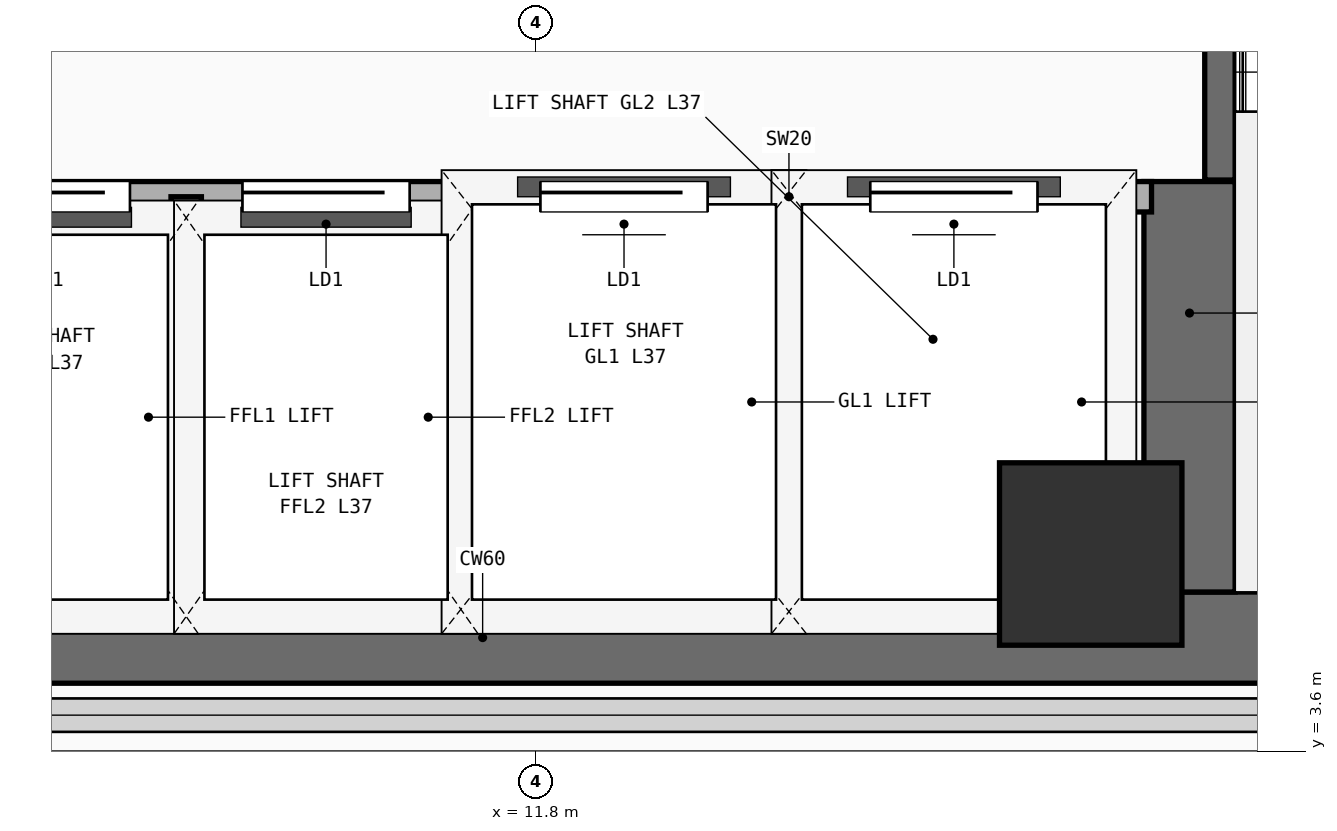
"""IFC4 building model, lengths in metres.
Left out: names, types, materials, properties, quantities, classifications, styles, units other than length and angle.
Written with IfcOpenShell. Run it as: python <this file> out.ifc"""

import sys

from ifc_helpers import new_model, si_unit, direction, frame, frame_2d, origin, origin_2d, place, context, subcontext, project, spatial, rectangle, extrude, element, fill, save


model = new_model("IFC4")
c1 = context("Model", 3, precision=1e-05, world=origin(), true_north=direction((0.0, 1.0)))
c2 = subcontext(c1, "Body", "Model", "MODEL_VIEW")
j1 = project(units=[si_unit("LENGTHUNIT", "METRE"), si_unit("PLANEANGLEUNIT", "RADIAN")], contexts=[c1])
p1 = place(None, origin())
s1 = spatial("IfcSite", under=j1, at=p1, CompositionType="ELEMENT")
p2 = place(p1, origin())
s2 = spatial("IfcBuilding", under=s1, at=p2, CompositionType="ELEMENT")
p3 = place(p2, frame((0.0, 0.0, 146.2)))
s3 = spatial("IfcBuildingStorey", under=s2, at=p3, CompositionType="ELEMENT", Elevation=146.2)
p4 = place(p3, frame((7.15, 4.35, 0.0), z_axis=(0.0, 0.0, 1.0), x_axis=(1.0, 0.0, 0.0)))
e1 = element("IfcWall", 1, at=p4, inside=s3, PredefinedType="SHEAR", context=c2, shape_type="SweptSolid", body=[
    extrude(rectangle(XDim=13.95, YDim=0.6, at=frame_2d((6.975, 0.0))), origin(), (0.0, 0.0, 1.0), 3.56),
])
p5 = place(p3, frame((16.1, 4.65, 0.0), z_axis=(0.0, 0.0, 1.0), x_axis=(0.0, 1.0, 0.0)))
e2 = element("IfcWall", 2, at=p5, inside=s3, PredefinedType="SHEAR", context=c2, shape_type="SweptSolid", body=[
    extrude(rectangle(XDim=2.7, YDim=0.6, at=frame_2d((1.35, 0.0))), origin(), (0.0, 0.0, 1.0), 3.56),
])
p6 = place(p3, frame((15.45, 4.9, 0.0), z_axis=(0.0, 0.0, 1.0), x_axis=(1.0, 0.0, 0.0)))
e3 = element("IfcColumn", 3, at=p6, inside=s3, PredefinedType="COLUMN", context=c2, shape_type="SweptSolid", body=[
    extrude(rectangle(XDim=1.2, YDim=1.2, at=origin_2d()), origin(), (0.0, 0.0, 1.0), 3.56),
])
p7 = place(p3, frame((16.3, 7.36, 0.0), z_axis=(0.0, 0.0, 1.0), x_axis=(0.0, 1.0, 0.0)))
e4 = element("IfcWall", 4, at=p7, inside=s3, PredefinedType="SHEAR", context=c2, shape_type="SweptSolid", body=[
    extrude(rectangle(XDim=2.58, YDim=0.2, at=frame_2d((1.29, 0.0))), origin(), (0.0, 0.0, 1.0), 3.56),
])
p8 = place(p3, frame((7.5, 7.25, 0.0), z_axis=(0.0, 0.0, 1.0), x_axis=(1.0, 0.0, 0.0)))
e5 = element("IfcWall", 5, at=p8, inside=s3, PredefinedType="PARTITIONING", context=c2, shape_type="SweptSolid", body=[
    extrude(rectangle(XDim=8.35, YDim=0.2, at=frame_2d((4.175, 0.0))), origin(), (0.0, 0.0, 1.0), 3.56),
])
p9 = place(p8, frame((0.53, 0.0, 0.0)))
e6 = element("IfcOpeningElement", 6, at=p9, cuts=e5, PredefinedType="OPENING", context=c2, shape_type="SweptSolid", body=[
    extrude(rectangle(XDim=1.1, YDim=2.2, at=frame_2d((0.55, 1.1))), frame((0.0, 0.11, 0.0), z_axis=(0.0, -1.0, 0.0), x_axis=(1.0, 0.0, 0.0)), (0.0, 0.0, 1.0), 0.22),
])
p10 = place(p8, frame((2.37, 0.0, 0.0)))
e7 = element("IfcOpeningElement", 7, at=p10, cuts=e5, PredefinedType="OPENING", context=c2, shape_type="SweptSolid", body=[
    extrude(rectangle(XDim=1.1, YDim=2.2, at=frame_2d((0.55, 1.1))), frame((0.0, 0.11, 0.0), z_axis=(0.0, -1.0, 0.0), x_axis=(1.0, 0.0, 0.0)), (0.0, 0.0, 1.0), 0.22),
])
p11 = place(p8, frame((4.33, 0.0, 0.0)))
e8 = element("IfcOpeningElement", 8, at=p11, cuts=e5, PredefinedType="OPENING", context=c2, shape_type="SweptSolid", body=[
    extrude(rectangle(XDim=1.1, YDim=2.2, at=frame_2d((0.55, 1.1))), frame((0.0, 0.11, 0.0), z_axis=(0.0, -1.0, 0.0), x_axis=(1.0, 0.0, 0.0)), (0.0, 0.0, 1.0), 0.22),
])
p12 = place(p8, frame((6.5, 0.0, 0.0)))
e9 = element("IfcOpeningElement", 9, at=p12, cuts=e5, PredefinedType="OPENING", context=c2, shape_type="SweptSolid", body=[
    extrude(rectangle(XDim=1.1, YDim=2.2, at=frame_2d((0.55, 1.1))), frame((0.0, 0.11, 0.0), z_axis=(0.0, -1.0, 0.0), x_axis=(1.0, 0.0, 0.0)), (0.0, 0.0, 1.0), 0.22),
])
for number, where, z_axis, x_axis in (
    (10, (9.5, 4.45, 0.0), (0.0, 0.0, 1.0), (0.0, 1.0, 0.0)),
    (11, (11.36, 4.45, 0.0), (0.0, 0.0, 1.0), (0.0, 1.0, 0.0)),
    (12, (13.46, 4.45, 0.0), (0.0, 0.0, 1.0), (0.0, 1.0, 0.0)),
):
    element("IfcWall", number, at=place(p3, frame(where, z_axis=z_axis, x_axis=x_axis)), inside=s3, PredefinedType="PARTITIONING", context=c2, shape_type="SweptSolid", body=[
        extrude(rectangle(XDim=2.8, YDim=0.2, at=frame_2d((1.4, 0.0))), origin(), (0.0, 0.0, 1.0), 3.56),
    ])
p13 = place(p9, origin())
e13 = element("IfcDoor", 13, at=p13, inside=s3, OperationType="SLIDING_TO_LEFT", PredefinedType="DOOR", context=c2, shape_type="SweptSolid", body=[
    extrude(rectangle(XDim=1.1, YDim=2.2, at=frame_2d((0.55, 1.1))), frame((0.0, 0.025, 0.0), z_axis=(0.0, -1.0, 0.0), x_axis=(1.0, 0.0, 0.0)), (0.0, 0.0, 1.0), 0.05),
])
fill(e6, e13)
p14 = place(p10, origin())
e14 = element("IfcDoor", 14, at=p14, inside=s3, OperationType="SLIDING_TO_LEFT", PredefinedType="DOOR", context=c2, shape_type="SweptSolid", body=[
    extrude(rectangle(XDim=1.1, YDim=2.2, at=frame_2d((0.55, 1.1))), frame((0.0, 0.025, 0.0), z_axis=(0.0, -1.0, 0.0), x_axis=(1.0, 0.0, 0.0)), (0.0, 0.0, 1.0), 0.05),
])
fill(e7, e14)
p15 = place(p11, origin())
e15 = element("IfcDoor", 15, at=p15, inside=s3, OperationType="SLIDING_TO_LEFT", PredefinedType="DOOR", context=c2, shape_type="SweptSolid", body=[
    extrude(rectangle(XDim=1.1, YDim=2.2, at=frame_2d((0.55, 1.1))), frame((0.0, 0.025, 0.0), z_axis=(0.0, -1.0, 0.0), x_axis=(1.0, 0.0, 0.0)), (0.0, 0.0, 1.0), 0.05),
])
fill(e8, e15)
p16 = place(p12, origin())
e16 = element("IfcDoor", 16, at=p16, inside=s3, OperationType="SLIDING_TO_LEFT", PredefinedType="DOOR", context=c2, shape_type="SweptSolid", body=[
    extrude(rectangle(XDim=1.1, YDim=2.2, at=frame_2d((0.55, 1.1))), frame((0.0, 0.025, 0.0), z_axis=(0.0, -1.0, 0.0), x_axis=(1.0, 0.0, 0.0)), (0.0, 0.0, 1.0), 0.05),
])
fill(e9, e16)
save(model, sys.argv[1])
